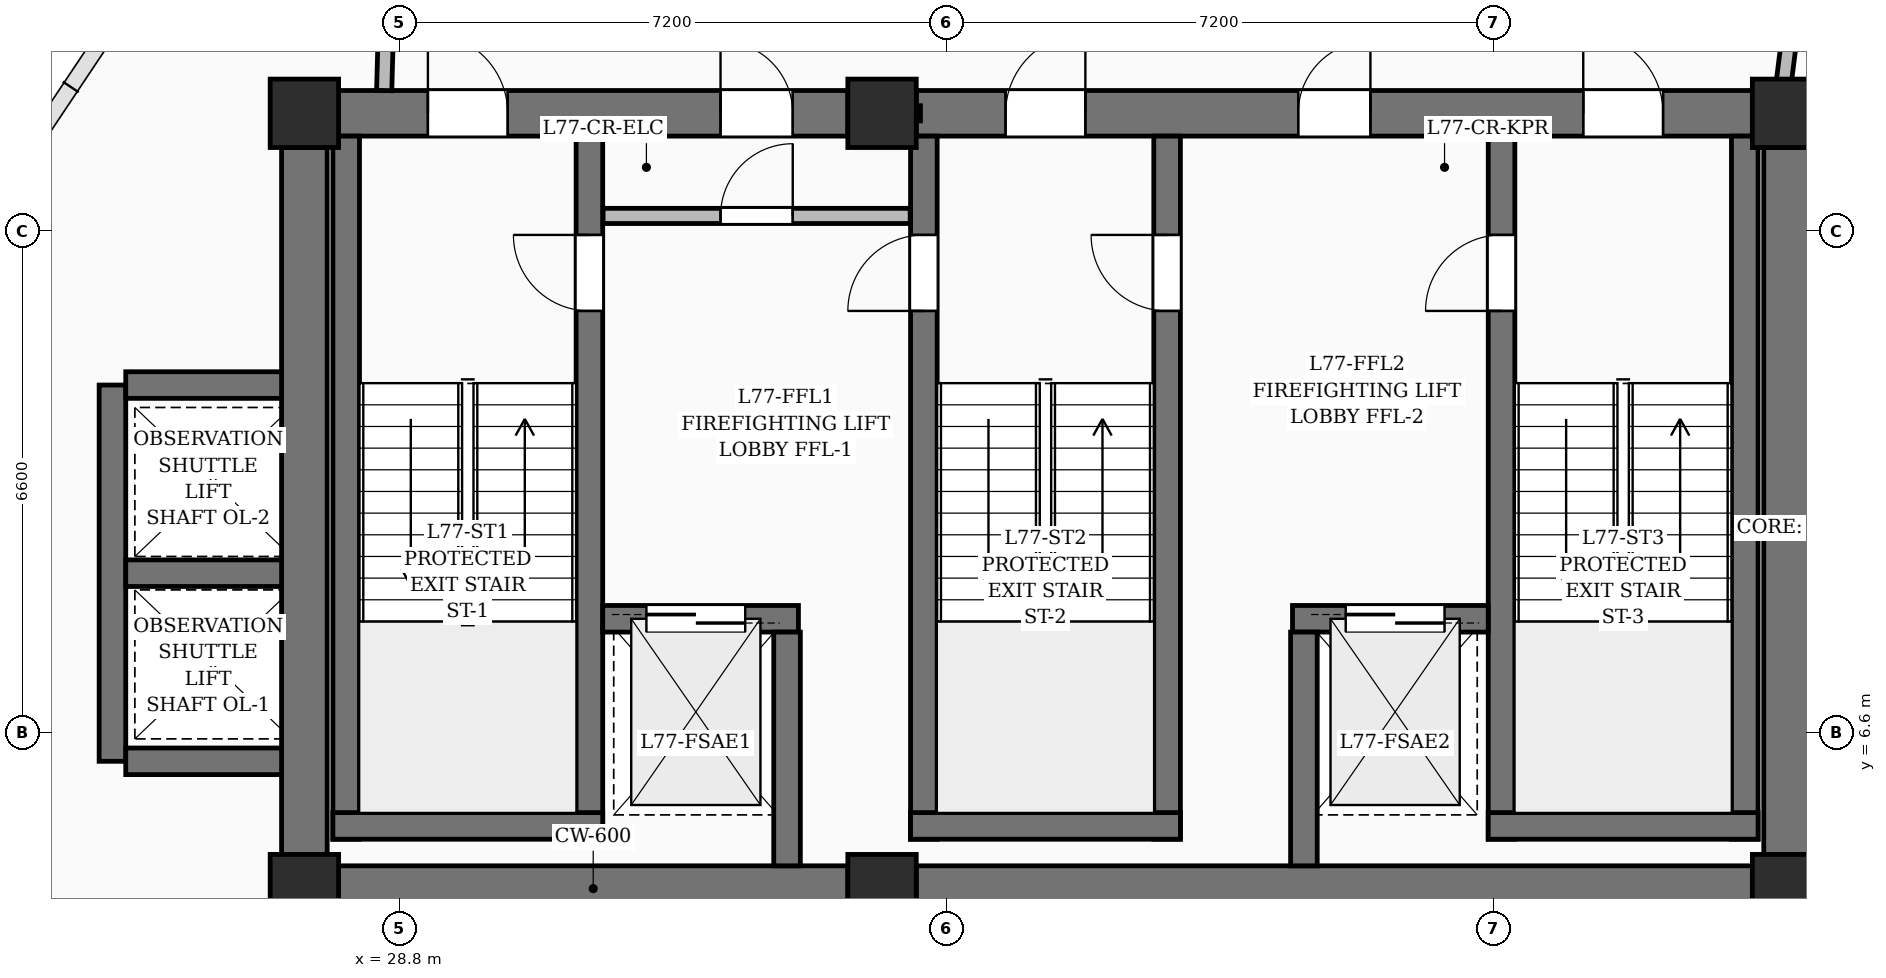
"""IFC4 building model, lengths in metres.
Left out: names, types, materials, properties, quantities, classifications, styles, units other than length and angle.
Written with IfcOpenShell. Run it as: python <this file> out.ifc"""

import sys

from ifc_helpers import new_model, si_unit, direction, frame, frame_2d, origin, origin_2d, place, context, subcontext, project, spatial, rectangle, extrude, element, fill, save


model = new_model("IFC4")
c1 = context("Model", 3, precision=1e-05, world=origin(), true_north=direction((0.0, 1.0)))
c2 = subcontext(c1, "Body", "Model", "MODEL_VIEW")
j1 = project(units=[si_unit("LENGTHUNIT", "METRE"), si_unit("PLANEANGLEUNIT", "RADIAN")], contexts=[c1])
p1 = place(None, origin())
s1 = spatial("IfcSite", under=j1, at=p1, CompositionType="ELEMENT")
p2 = place(p1, origin())
s2 = spatial("IfcBuilding", under=s1, at=p2, CompositionType="ELEMENT")
p3 = place(p2, frame((0.0, 0.0, 298.5)))
s3 = spatial("IfcBuildingStorey", under=s2, at=p3, CompositionType="ELEMENT", Elevation=298.5)
for number, where, z_axis, x_axis in (
    (1, (27.55, 4.55, 0.0), (0.0, 0.0, 1.0), (1.0, 0.0, 0.0)),
    (2, (35.15, 4.55, 0.0), (0.0, 0.0, 1.0), (1.0, 0.0, 0.0)),
    (3, (47.05, 4.55, 0.0), (0.0, 0.0, 1.0), (1.0, 0.0, 0.0)),
    (4, (27.55, 14.75, 0.0), (0.0, 0.0, 1.0), (1.0, 0.0, 0.0)),
    (5, (35.15, 14.75, 0.0), (0.0, 0.0, 1.0), (1.0, 0.0, 0.0)),
    (6, (47.05, 14.75, 0.0), (0.0, 0.0, 1.0), (1.0, 0.0, 0.0)),
):
    element("IfcColumn", number, at=place(p3, frame(where, z_axis=z_axis, x_axis=x_axis)), inside=s3, PredefinedType="COLUMN", context=c2, shape_type="SweptSolid", body=[
        extrude(rectangle(XDim=0.9, YDim=0.9, at=origin_2d()), origin(), (0.0, 0.0, 1.0), 4.0),
    ])
p4 = place(p3, frame((28.0, 4.55, 0.0), z_axis=(0.0, 0.0, 1.0), x_axis=(1.0, 0.0, 0.0)))
e7 = element("IfcWall", 7, at=p4, inside=s3, PredefinedType="SHEAR", context=c2, shape_type="SweptSolid", body=[
    extrude(rectangle(XDim=6.7, YDim=0.6, at=frame_2d((3.35, 0.0))), origin(), (0.0, 0.0, 1.0), 4.0),
])
p5 = place(p3, frame((35.6, 4.55, 0.0), z_axis=(0.0, 0.0, 1.0), x_axis=(1.0, 0.0, 0.0)))
e8 = element("IfcWall", 8, at=p5, inside=s3, PredefinedType="SHEAR", context=c2, shape_type="SweptSolid", body=[
    extrude(rectangle(XDim=11.0, YDim=0.6, at=frame_2d((5.5, 0.0))), origin(), (0.0, 0.0, 1.0), 4.0),
])
p6 = place(p3, frame((28.0, 14.75, 0.0), z_axis=(0.0, 0.0, 1.0), x_axis=(1.0, 0.0, 0.0)))
e9 = element("IfcWall", 9, at=p6, inside=s3, PredefinedType="SHEAR", context=c2, shape_type="SweptSolid", body=[
    extrude(rectangle(XDim=6.7, YDim=0.6, at=frame_2d((3.35, 0.0))), origin(), (0.0, 0.0, 1.0), 4.0),
])
p7 = place(p6, frame((1.175, 0.0, 0.0)))
e10 = element("IfcOpeningElement", 10, at=p7, cuts=e9, PredefinedType="OPENING", context=c2, shape_type="SweptSolid", body=[
    extrude(rectangle(XDim=1.05, YDim=2.15, at=frame_2d((0.525, 1.075))), frame((0.0, 0.31, 0.0), z_axis=(0.0, -1.0, 0.0), x_axis=(1.0, 0.0, 0.0)), (0.0, 0.0, 1.0), 0.62),
])
p8 = place(p6, frame((5.025, 0.0, 0.0)))
e11 = element("IfcOpeningElement", 11, at=p8, cuts=e9, PredefinedType="OPENING", context=c2, shape_type="SweptSolid", body=[
    extrude(rectangle(XDim=0.95, YDim=2.15, at=frame_2d((0.475, 1.075))), frame((0.0, 0.31, 0.0), z_axis=(0.0, -1.0, 0.0), x_axis=(1.0, 0.0, 0.0)), (0.0, 0.0, 1.0), 0.62),
])
p9 = place(p3, frame((35.6, 14.75, 0.0), z_axis=(0.0, 0.0, 1.0), x_axis=(1.0, 0.0, 0.0)))
e12 = element("IfcWall", 12, at=p9, inside=s3, PredefinedType="SHEAR", context=c2, shape_type="SweptSolid", body=[
    extrude(rectangle(XDim=11.0, YDim=0.6, at=frame_2d((5.5, 0.0))), origin(), (0.0, 0.0, 1.0), 4.0),
])
p10 = place(p9, frame((1.175, 0.0, 0.0)))
e13 = element("IfcOpeningElement", 13, at=p10, cuts=e12, PredefinedType="OPENING", context=c2, shape_type="SweptSolid", body=[
    extrude(rectangle(XDim=1.05, YDim=2.15, at=frame_2d((0.525, 1.075))), frame((0.0, 0.31, 0.0), z_axis=(0.0, -1.0, 0.0), x_axis=(1.0, 0.0, 0.0)), (0.0, 0.0, 1.0), 0.62),
])
p11 = place(p9, frame((8.775, 0.0, 0.0)))
e14 = element("IfcOpeningElement", 14, at=p11, cuts=e12, PredefinedType="OPENING", context=c2, shape_type="SweptSolid", body=[
    extrude(rectangle(XDim=1.05, YDim=2.15, at=frame_2d((0.525, 1.075))), frame((0.0, 0.31, 0.0), z_axis=(0.0, -1.0, 0.0), x_axis=(1.0, 0.0, 0.0)), (0.0, 0.0, 1.0), 0.62),
])
p12 = place(p9, frame((5.025, 0.0, 0.0)))
e15 = element("IfcOpeningElement", 15, at=p12, cuts=e12, PredefinedType="OPENING", context=c2, shape_type="SweptSolid", body=[
    extrude(rectangle(XDim=0.95, YDim=2.15, at=frame_2d((0.475, 1.075))), frame((0.0, 0.31, 0.0), z_axis=(0.0, -1.0, 0.0), x_axis=(1.0, 0.0, 0.0)), (0.0, 0.0, 1.0), 0.62),
])
for number, where, z_axis, x_axis in (
    (16, (27.55, 5.0, 0.0), (0.0, 0.0, 1.0), (0.0, 1.0, 0.0)),
    (17, (47.05, 5.0, 0.0), (0.0, 0.0, 1.0), (0.0, 1.0, 0.0)),
):
    element("IfcWall", number, at=place(p3, frame(where, z_axis=z_axis, x_axis=x_axis)), inside=s3, PredefinedType="SHEAR", context=c2, shape_type="SweptSolid", body=[
        extrude(rectangle(XDim=9.3, YDim=0.6, at=frame_2d((4.65, 0.0))), origin(), (0.0, 0.0, 1.0), 4.0),
    ])
p13 = place(p3, frame((28.1, 5.2, 0.0), z_axis=(0.0, 0.0, 1.0), x_axis=(0.0, 1.0, 0.0)))
e18 = element("IfcWall", 18, at=p13, inside=s3, PredefinedType="SOLIDWALL", context=c2, shape_type="SweptSolid", body=[
    extrude(rectangle(XDim=9.25, YDim=0.35, at=frame_2d((4.625, 0.0))), origin(), (0.0, 0.0, 1.0), 4.0),
])
p14 = place(p3, frame((31.3, 5.2, 0.0), z_axis=(0.0, 0.0, 1.0), x_axis=(0.0, 1.0, 0.0)))
e19 = element("IfcWall", 19, at=p14, inside=s3, PredefinedType="SOLIDWALL", context=c2, shape_type="SweptSolid", body=[
    extrude(rectangle(XDim=9.25, YDim=0.35, at=frame_2d((4.625, 0.0))), origin(), (0.0, 0.0, 1.0), 4.0),
])
p15 = place(p14, frame((6.95, 0.0, 0.0)))
e20 = element("IfcOpeningElement", 20, at=p15, cuts=e19, PredefinedType="OPENING", context=c2, shape_type="SweptSolid", body=[
    extrude(rectangle(XDim=1.0, YDim=2.15, at=frame_2d((0.5, 1.075))), frame((0.0, 0.185, 0.0), z_axis=(0.0, -1.0, 0.0), x_axis=(1.0, 0.0, 0.0)), (0.0, 0.0, 1.0), 0.37),
])
p16 = place(p3, frame((27.925, 5.375, 0.0), z_axis=(0.0, 0.0, 1.0), x_axis=(1.0, 0.0, 0.0)))
e21 = element("IfcWall", 21, at=p16, inside=s3, PredefinedType="SOLIDWALL", context=c2, shape_type="SweptSolid", body=[
    extrude(rectangle(XDim=3.55, YDim=0.35, at=frame_2d((1.775, 0.0))), origin(), (0.0, 0.0, 1.0), 4.0),
])
p17 = place(p3, frame((35.7, 5.2, 0.0), z_axis=(0.0, 0.0, 1.0), x_axis=(0.0, 1.0, 0.0)))
e22 = element("IfcWall", 22, at=p17, inside=s3, PredefinedType="SOLIDWALL", context=c2, shape_type="SweptSolid", body=[
    extrude(rectangle(XDim=9.25, YDim=0.35, at=frame_2d((4.625, 0.0))), origin(), (0.0, 0.0, 1.0), 4.0),
])
p18 = place(p17, frame((6.95, 0.0, 0.0)))
e23 = element("IfcOpeningElement", 23, at=p18, cuts=e22, PredefinedType="OPENING", context=c2, shape_type="SweptSolid", body=[
    extrude(rectangle(XDim=1.0, YDim=2.15, at=frame_2d((0.5, 1.075))), frame((0.0, 0.185, 0.0), z_axis=(0.0, -1.0, 0.0), x_axis=(1.0, 0.0, 0.0)), (0.0, 0.0, 1.0), 0.37),
])
p19 = place(p3, frame((38.9, 5.2, 0.0), z_axis=(0.0, 0.0, 1.0), x_axis=(0.0, 1.0, 0.0)))
e24 = element("IfcWall", 24, at=p19, inside=s3, PredefinedType="SOLIDWALL", context=c2, shape_type="SweptSolid", body=[
    extrude(rectangle(XDim=9.25, YDim=0.35, at=frame_2d((4.625, 0.0))), origin(), (0.0, 0.0, 1.0), 4.0),
])
p20 = place(p19, frame((6.95, 0.0, 0.0)))
e25 = element("IfcOpeningElement", 25, at=p20, cuts=e24, PredefinedType="OPENING", context=c2, shape_type="SweptSolid", body=[
    extrude(rectangle(XDim=1.0, YDim=2.15, at=frame_2d((0.5, 1.075))), frame((0.0, 0.185, 0.0), z_axis=(0.0, -1.0, 0.0), x_axis=(1.0, 0.0, 0.0)), (0.0, 0.0, 1.0), 0.37),
])
p21 = place(p3, frame((35.525, 5.375, 0.0), z_axis=(0.0, 0.0, 1.0), x_axis=(1.0, 0.0, 0.0)))
e26 = element("IfcWall", 26, at=p21, inside=s3, PredefinedType="SOLIDWALL", context=c2, shape_type="SweptSolid", body=[
    extrude(rectangle(XDim=3.55, YDim=0.35, at=frame_2d((1.775, 0.0))), origin(), (0.0, 0.0, 1.0), 4.0),
])
p22 = place(p3, frame((43.3, 5.2, 0.0), z_axis=(0.0, 0.0, 1.0), x_axis=(0.0, 1.0, 0.0)))
e27 = element("IfcWall", 27, at=p22, inside=s3, PredefinedType="SOLIDWALL", context=c2, shape_type="SweptSolid", body=[
    extrude(rectangle(XDim=9.25, YDim=0.35, at=frame_2d((4.625, 0.0))), origin(), (0.0, 0.0, 1.0), 4.0),
])
p23 = place(p22, frame((6.95, 0.0, 0.0)))
e28 = element("IfcOpeningElement", 28, at=p23, cuts=e27, PredefinedType="OPENING", context=c2, shape_type="SweptSolid", body=[
    extrude(rectangle(XDim=1.0, YDim=2.15, at=frame_2d((0.5, 1.075))), frame((0.0, 0.185, 0.0), z_axis=(0.0, -1.0, 0.0), x_axis=(1.0, 0.0, 0.0)), (0.0, 0.0, 1.0), 0.37),
])
p24 = place(p3, frame((46.5, 5.2, 0.0), z_axis=(0.0, 0.0, 1.0), x_axis=(0.0, 1.0, 0.0)))
e29 = element("IfcWall", 29, at=p24, inside=s3, PredefinedType="SOLIDWALL", context=c2, shape_type="SweptSolid", body=[
    extrude(rectangle(XDim=9.25, YDim=0.35, at=frame_2d((4.625, 0.0))), origin(), (0.0, 0.0, 1.0), 4.0),
])
p25 = place(p3, frame((43.125, 5.375, 0.0), z_axis=(0.0, 0.0, 1.0), x_axis=(1.0, 0.0, 0.0)))
e30 = element("IfcWall", 30, at=p25, inside=s3, PredefinedType="SOLIDWALL", context=c2, shape_type="SweptSolid", body=[
    extrude(rectangle(XDim=3.55, YDim=0.35, at=frame_2d((1.775, 0.0))), origin(), (0.0, 0.0, 1.0), 4.0),
])
p26 = place(p3, frame((31.475, 8.1, 0.0), z_axis=(0.0, 0.0, 1.0), x_axis=(1.0, 0.0, 0.0)))
e31 = element("IfcWall", 31, at=p26, inside=s3, PredefinedType="SOLIDWALL", context=c2, shape_type="SweptSolid", body=[
    extrude(rectangle(XDim=2.575, YDim=0.35, at=frame_2d((1.288, 0.0))), origin(), (0.0, 0.0, 1.0), 4.0),
])
p27 = place(p26, frame((0.575, 0.0, 0.0)))
e32 = element("IfcOpeningElement", 32, at=p27, cuts=e31, PredefinedType="OPENING", context=c2, shape_type="SweptSolid", body=[
    extrude(rectangle(XDim=1.3, YDim=2.25, at=frame_2d((0.65, 1.125))), frame((0.0, 0.185, 0.0), z_axis=(0.0, -1.0, 0.0), x_axis=(1.0, 0.0, 0.0)), (0.0, 0.0, 1.0), 0.37),
])
p28 = place(p3, frame((40.55, 8.1, 0.0), z_axis=(0.0, 0.0, 1.0), x_axis=(1.0, 0.0, 0.0)))
e33 = element("IfcWall", 33, at=p28, inside=s3, PredefinedType="SOLIDWALL", context=c2, shape_type="SweptSolid", body=[
    extrude(rectangle(XDim=2.575, YDim=0.35, at=frame_2d((1.288, 0.0))), origin(), (0.0, 0.0, 1.0), 4.0),
])
p29 = place(p28, frame((0.7, 0.0, 0.0)))
e34 = element("IfcOpeningElement", 34, at=p29, cuts=e33, PredefinedType="OPENING", context=c2, shape_type="SweptSolid", body=[
    extrude(rectangle(XDim=1.3, YDim=2.25, at=frame_2d((0.65, 1.125))), frame((0.0, 0.185, 0.0), z_axis=(0.0, -1.0, 0.0), x_axis=(1.0, 0.0, 0.0)), (0.0, 0.0, 1.0), 0.37),
])
for number, where, z_axis, x_axis in (
    (35, (33.9, 4.85, 0.0), (0.0, 0.0, 1.0), (0.0, 1.0, 0.0)),
    (36, (40.7, 4.85, 0.0), (0.0, 0.0, 1.0), (0.0, 1.0, 0.0)),
):
    element("IfcWall", number, at=place(p3, frame(where, z_axis=z_axis, x_axis=x_axis)), inside=s3, PredefinedType="SOLIDWALL", context=c2, shape_type="SweptSolid", body=[
        extrude(rectangle(XDim=3.075, YDim=0.35, at=frame_2d((1.538, 0.0))), origin(), (0.0, 0.0, 1.0), 4.0),
    ])
p30 = place(p3, frame((25.025, 6.225, 0.0), z_axis=(0.0, 0.0, 1.0), x_axis=(0.0, 1.0, 0.0)))
e37 = element("IfcWall", 37, at=p30, inside=s3, PredefinedType="SOLIDWALL", context=c2, shape_type="SweptSolid", body=[
    extrude(rectangle(XDim=4.95, YDim=0.35, at=frame_2d((2.475, 0.0))), origin(), (0.0, 0.0, 1.0), 4.0),
])
for number, where, z_axis, x_axis in (
    (38, (25.2, 6.225, 0.0), (0.0, 0.0, 1.0), (1.0, 0.0, 0.0)),
    (39, (25.2, 8.7, 0.0), (0.0, 0.0, 1.0), (1.0, 0.0, 0.0)),
    (40, (25.2, 11.175, 0.0), (0.0, 0.0, 1.0), (1.0, 0.0, 0.0)),
):
    element("IfcWall", number, at=place(p3, frame(where, z_axis=z_axis, x_axis=x_axis)), inside=s3, PredefinedType="SOLIDWALL", context=c2, shape_type="SweptSolid", body=[
        extrude(rectangle(XDim=2.05, YDim=0.35, at=frame_2d((1.025, 0.0))), origin(), (0.0, 0.0, 1.0), 4.0),
    ])
p31 = place(p3, frame((34.72, 14.75, 0.0), z_axis=(0.0, 0.0, 1.0), x_axis=(1.0, 0.0, 0.0)))
e41 = element("IfcWall", 41, at=p31, inside=s3, PredefinedType="PARTITIONING", context=c2, shape_type="SweptSolid", body=[
    extrude(rectangle(XDim=0.935, YDim=0.2, at=frame_2d((0.468, 0.0))), origin(), (0.0, 0.0, 1.0), 2.885),
])
p32 = place(p3, frame((31.48, 13.4, 0.0), z_axis=(0.0, 0.0, 1.0), x_axis=(1.0, 0.0, 0.0)))
e42 = element("IfcWall", 42, at=p32, inside=s3, PredefinedType="PARTITIONING", context=c2, shape_type="SweptSolid", body=[
    extrude(rectangle(XDim=4.04, YDim=0.2, at=frame_2d((2.02, 0.0))), origin(), (0.0, 0.0, 1.0), 3.7),
])
p33 = place(p32, frame((1.545, 0.0, 0.0)))
e43 = element("IfcOpeningElement", 43, at=p33, cuts=e42, PredefinedType="OPENING", context=c2, shape_type="SweptSolid", body=[
    extrude(rectangle(XDim=0.95, YDim=2.15, at=frame_2d((0.475, 1.075))), frame((0.0, 0.11, 0.0), z_axis=(0.0, -1.0, 0.0), x_axis=(1.0, 0.0, 0.0)), (0.0, 0.0, 1.0), 0.22),
])
p34 = place(p3, frame((28.678, 17.898, 0.0), z_axis=(0.0, 0.0, 1.0), x_axis=(-0.027336543978, -0.999626286851, 0.0)))
e44 = element("IfcWall", 44, at=p34, inside=s3, PredefinedType="PARTITIONING", context=c2, shape_type="SweptSolid", body=[
    extrude(rectangle(XDim=2.849, YDim=0.2, at=frame_2d((1.424, 0.0))), origin(), (0.0, 0.0, 1.0), 3.035),
])
p35 = place(p3, frame((47.0, 15.05, 0.0), z_axis=(0.0, 0.0, 1.0), x_axis=(0.123914013707, 0.992292959366, 0.0)))
e45 = element("IfcWall", 45, at=p35, inside=s3, PredefinedType="PARTITIONING", context=c2, shape_type="SweptSolid", body=[
    extrude(rectangle(XDim=2.987, YDim=0.2, at=frame_2d((1.493, 0.0))), origin(), (0.0, 0.0, 1.0), 3.035),
])
p36 = place(p7, origin())
e46 = element("IfcDoor", 46, at=p36, inside=s3, OperationType="SINGLE_SWING_LEFT", PredefinedType="DOOR", context=c2, shape_type="SweptSolid", body=[
    extrude(rectangle(XDim=1.05, YDim=2.15, at=frame_2d((0.525, 1.075))), frame((0.0, 0.025, 0.0), z_axis=(0.0, -1.0, 0.0), x_axis=(1.0, 0.0, 0.0)), (0.0, 0.0, 1.0), 0.05),
])
fill(e10, e46)
p37 = place(p10, origin())
e47 = element("IfcDoor", 47, at=p37, inside=s3, OperationType="SINGLE_SWING_RIGHT", PredefinedType="DOOR", context=c2, shape_type="SweptSolid", body=[
    extrude(rectangle(XDim=1.05, YDim=2.15, at=frame_2d((0.525, 1.075))), frame((0.0, 0.025, 0.0), z_axis=(0.0, -1.0, 0.0), x_axis=(1.0, 0.0, 0.0)), (0.0, 0.0, 1.0), 0.05),
])
fill(e13, e47)
p38 = place(p11, origin())
e48 = element("IfcDoor", 48, at=p38, inside=s3, OperationType="SINGLE_SWING_LEFT", PredefinedType="DOOR", context=c2, shape_type="SweptSolid", body=[
    extrude(rectangle(XDim=1.05, YDim=2.15, at=frame_2d((0.525, 1.075))), frame((0.0, 0.025, 0.0), z_axis=(0.0, -1.0, 0.0), x_axis=(1.0, 0.0, 0.0)), (0.0, 0.0, 1.0), 0.05),
])
fill(e14, e48)
p39 = place(p15, origin())
e49 = element("IfcDoor", 49, at=p39, inside=s3, OperationType="SINGLE_SWING_RIGHT", PredefinedType="DOOR", context=c2, shape_type="SweptSolid", body=[
    extrude(rectangle(XDim=1.0, YDim=2.15, at=frame_2d((0.5, 1.075))), frame((0.0, 0.025, 0.0), z_axis=(0.0, -1.0, 0.0), x_axis=(1.0, 0.0, 0.0)), (0.0, 0.0, 1.0), 0.05),
])
fill(e20, e49)
p40 = place(p18, origin())
e50 = element("IfcDoor", 50, at=p40, inside=s3, OperationType="SINGLE_SWING_LEFT", PredefinedType="DOOR", context=c2, shape_type="SweptSolid", body=[
    extrude(rectangle(XDim=1.0, YDim=2.15, at=frame_2d((0.5, 1.075))), frame((0.0, 0.025, 0.0), z_axis=(0.0, -1.0, 0.0), x_axis=(1.0, 0.0, 0.0)), (0.0, 0.0, 1.0), 0.05),
])
fill(e23, e50)
p41 = place(p20, origin())
e51 = element("IfcDoor", 51, at=p41, inside=s3, OperationType="SINGLE_SWING_RIGHT", PredefinedType="DOOR", context=c2, shape_type="SweptSolid", body=[
    extrude(rectangle(XDim=1.0, YDim=2.15, at=frame_2d((0.5, 1.075))), frame((0.0, 0.025, 0.0), z_axis=(0.0, -1.0, 0.0), x_axis=(1.0, 0.0, 0.0)), (0.0, 0.0, 1.0), 0.05),
])
fill(e25, e51)
p42 = place(p23, origin())
e52 = element("IfcDoor", 52, at=p42, inside=s3, OperationType="SINGLE_SWING_LEFT", PredefinedType="DOOR", context=c2, shape_type="SweptSolid", body=[
    extrude(rectangle(XDim=1.0, YDim=2.15, at=frame_2d((0.5, 1.075))), frame((0.0, 0.025, 0.0), z_axis=(0.0, -1.0, 0.0), x_axis=(1.0, 0.0, 0.0)), (0.0, 0.0, 1.0), 0.05),
])
fill(e28, e52)
p43 = place(p27, origin())
e53 = element("IfcDoor", 53, at=p43, inside=s3, OperationType="DOUBLE_DOOR_SLIDING", PredefinedType="DOOR", context=c2, shape_type="SweptSolid", body=[
    extrude(rectangle(XDim=1.3, YDim=2.25, at=frame_2d((0.65, 1.125))), frame((0.0, 0.025, 0.0), z_axis=(0.0, -1.0, 0.0), x_axis=(1.0, 0.0, 0.0)), (0.0, 0.0, 1.0), 0.05),
])
fill(e32, e53)
p44 = place(p29, origin())
e54 = element("IfcDoor", 54, at=p44, inside=s3, OperationType="DOUBLE_DOOR_SLIDING", PredefinedType="DOOR", context=c2, shape_type="SweptSolid", body=[
    extrude(rectangle(XDim=1.3, YDim=2.25, at=frame_2d((0.65, 1.125))), frame((0.0, 0.025, 0.0), z_axis=(0.0, -1.0, 0.0), x_axis=(1.0, 0.0, 0.0)), (0.0, 0.0, 1.0), 0.05),
])
fill(e34, e54)
p45 = place(p33, origin())
e55 = element("IfcDoor", 55, at=p45, inside=s3, OperationType="SINGLE_SWING_RIGHT", PredefinedType="DOOR", context=c2, shape_type="SweptSolid", body=[
    extrude(rectangle(XDim=0.95, YDim=2.15, at=frame_2d((0.475, 1.075))), frame((0.0, 0.025, 0.0), z_axis=(0.0, -1.0, 0.0), x_axis=(1.0, 0.0, 0.0)), (0.0, 0.0, 1.0), 0.05),
])
fill(e43, e55)
p46 = place(p8, origin())
e56 = element("IfcDoor", 56, at=p46, inside=s3, OperationType="SINGLE_SWING_LEFT", PredefinedType="DOOR", context=c2, shape_type="SweptSolid", body=[
    extrude(rectangle(XDim=0.95, YDim=2.15, at=frame_2d((0.475, 1.075))), frame((0.0, 0.025, 0.0), z_axis=(0.0, -1.0, 0.0), x_axis=(1.0, 0.0, 0.0)), (0.0, 0.0, 1.0), 0.05),
])
fill(e11, e56)
p47 = place(p12, origin())
e57 = element("IfcDoor", 57, at=p47, inside=s3, OperationType="SINGLE_SWING_RIGHT", PredefinedType="DOOR", context=c2, shape_type="SweptSolid", body=[
    extrude(rectangle(XDim=0.95, YDim=2.15, at=frame_2d((0.475, 1.075))), frame((0.0, 0.025, 0.0), z_axis=(0.0, -1.0, 0.0), x_axis=(1.0, 0.0, 0.0)), (0.0, 0.0, 1.0), 0.05),
])
fill(e15, e57)
save(model, sys.argv[1])
